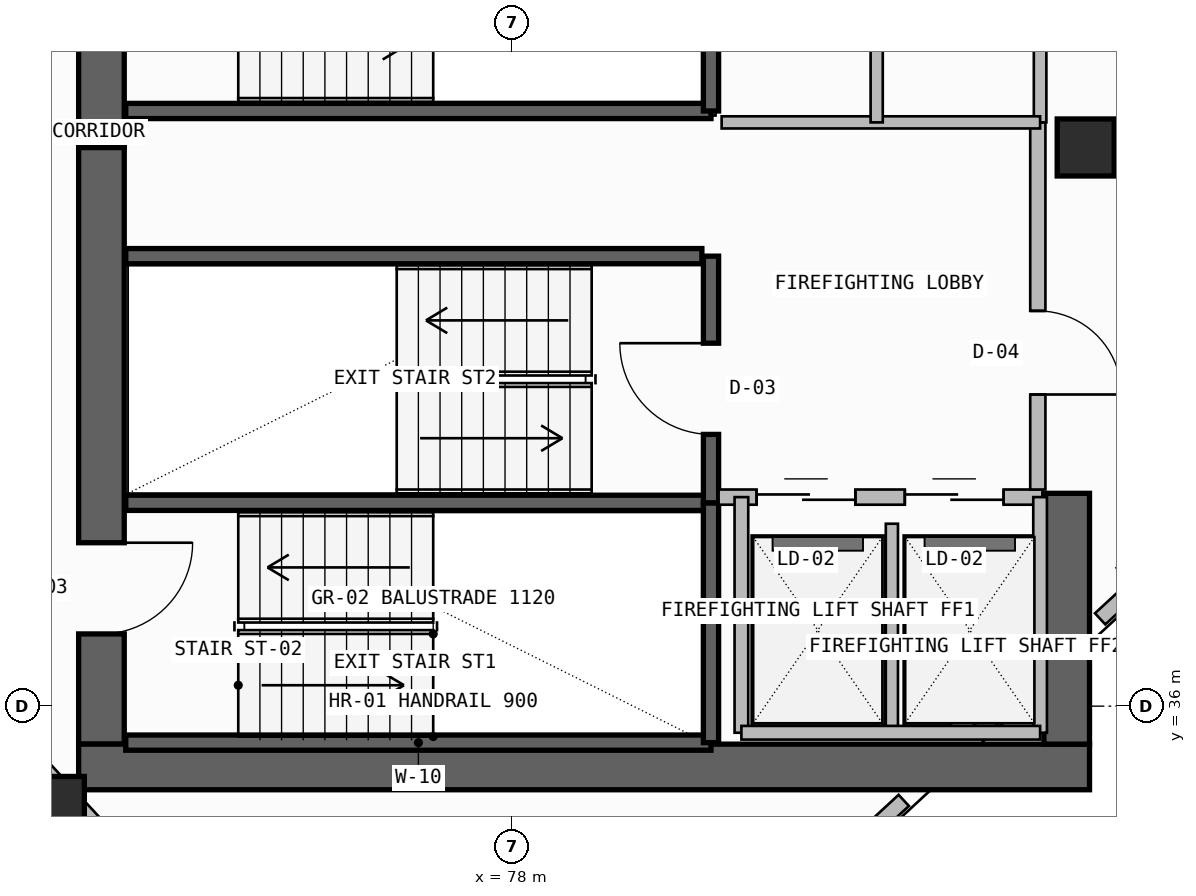
"""IFC4 building model, lengths in metres.
Left out: names, types, materials, properties, quantities, classifications, styles, units other than length and angle.
Written with IfcOpenShell. Run it as: python <this file> out.ifc"""

import sys

from ifc_helpers import new_model, si_unit, direction, frame, frame_2d, origin, origin_2d, place, context, subcontext, project, spatial, rectangle, extrude, element, fill, save


model = new_model("IFC4")
c1 = context("Model", 3, precision=1e-05, world=origin(), true_north=direction((0.0, 1.0)))
c2 = subcontext(c1, "Body", "Model", "MODEL_VIEW")
j1 = project(units=[si_unit("LENGTHUNIT", "METRE"), si_unit("PLANEANGLEUNIT", "RADIAN")], contexts=[c1])
p1 = place(None, origin())
s1 = spatial("IfcSite", under=j1, at=p1, CompositionType="ELEMENT")
p2 = place(p1, origin())
s2 = spatial("IfcBuilding", under=s1, at=p2, CompositionType="ELEMENT")
p3 = place(p2, frame((0.0, 0.0, 281.86)))
s3 = spatial("IfcBuildingStorey", under=s2, at=p3, CompositionType="ELEMENT", Elevation=281.86)
p4 = place(p3, frame((72.6, 35.5, -0.26), z_axis=(0.0, 0.0, 1.0), x_axis=(0.0, 1.0, 0.0)))
e1 = element("IfcWall", 1, at=p4, inside=s3, PredefinedType="SHEAR", context=c2, shape_type="SweptSolid", body=[
    extrude(rectangle(XDim=7.85, YDim=0.6, at=frame_2d((3.925, 0.0))), origin(), (0.0, 0.0, 1.0), 3.52),
])
p5 = place(p4, frame((1.45, 0.0, 0.26)))
e2 = element("IfcOpeningElement", 2, at=p5, cuts=e1, PredefinedType="OPENING", context=c2, shape_type="SweptSolid", body=[
    extrude(rectangle(XDim=1.2, YDim=2.2, at=frame_2d((0.6, 1.1))), frame((0.0, 0.31, 0.0), z_axis=(0.0, -1.0, 0.0), x_axis=(1.0, 0.0, 0.0)), (0.0, 0.0, 1.0), 0.62),
])
p6 = place(p3, frame((72.3, 35.2, -0.26), z_axis=(0.0, 0.0, 1.0), x_axis=(1.0, 0.0, 0.0)))
e3 = element("IfcWall", 3, at=p6, inside=s3, PredefinedType="SHEAR", context=c2, shape_type="SweptSolid", body=[
    extrude(rectangle(XDim=13.3, YDim=0.6, at=frame_2d((6.65, 0.0))), origin(), (0.0, 0.0, 1.0), 3.52),
])
p7 = place(p3, frame((85.3, 35.5, -0.26), z_axis=(0.0, 0.0, 1.0), x_axis=(0.0, 1.0, 0.0)))
e4 = element("IfcWall", 4, at=p7, inside=s3, PredefinedType="SHEAR", context=c2, shape_type="SweptSolid", body=[
    extrude(rectangle(XDim=3.3, YDim=0.6, at=frame_2d((1.65, 0.0))), origin(), (0.0, 0.0, 1.0), 3.52),
])
p8 = place(p3, frame((72.6, 43.35, -0.26), z_axis=(0.0, 0.0, 1.0), x_axis=(0.0, 1.0, 0.0)))
e5 = element("IfcWall", 5, at=p8, inside=s3, PredefinedType="SHEAR", context=c2, shape_type="SweptSolid", body=[
    extrude(rectangle(XDim=12.7, YDim=0.6, at=frame_2d((6.35, 0.0))), origin(), (0.0, 0.0, 1.0), 3.52),
])
p9 = place(p8, frame((1.35, 0.0, 0.26)))
e6 = element("IfcOpeningElement", 6, at=p9, cuts=e5, PredefinedType="OPENING", context=c2, shape_type="SweptSolid", body=[
    extrude(rectangle(XDim=1.2, YDim=2.2, at=frame_2d((0.6, 1.1))), frame((0.0, 0.31, 0.0), z_axis=(0.0, -1.0, 0.0), x_axis=(1.0, 0.0, 0.0)), (0.0, 0.0, 1.0), 0.62),
])
for number, where, z_axis, x_axis in (
    (7, (72.0, 34.7, 0.0), (0.0, 0.0, 1.0), (1.0, 0.0, 0.0)),
    (8, (85.55, 43.35, 0.0), (0.0, 0.0, 1.0), (1.0, 0.0, 0.0)),
):
    element("IfcColumn", number, at=place(p3, frame(where, z_axis=z_axis, x_axis=x_axis)), inside=s3, PredefinedType="COLUMN", context=c2, shape_type="SweptSolid", body=[
        extrude(rectangle(XDim=0.75, YDim=0.75, at=origin_2d()), origin(), (0.0, 0.0, 1.0), 3.52),
    ])
p10 = place(p3, frame((72.881, 34.058, 0.0), z_axis=(0.0, 0.0, 1.0), x_axis=(-0.678651758246, 0.734460203843, 0.0)))
e9 = element("IfcWall", 9, at=p10, inside=s3, PredefinedType="PARAPET", context=c2, shape_type="SweptSolid", body=[
    extrude(rectangle(XDim=0.927, YDim=0.2, at=frame_2d((0.464, 0.0))), origin(), (0.0, 0.0, 1.0), 1.15),
])
p11 = place(p3, frame((72.059, 34.948, 0.0), z_axis=(0.0, 0.0, 1.0), x_axis=(-0.678740051818, 0.734378609478, 0.0)))
e10 = element("IfcWall", 10, at=p11, inside=s3, PredefinedType="PARAPET", context=c2, shape_type="SweptSolid", body=[
    extrude(rectangle(XDim=0.97, YDim=0.2, at=frame_2d((0.485, 0.0))), origin(), (0.0, 0.0, 1.0), 1.15),
])
p12 = place(p3, frame((86.192, 37.566, 0.0), z_axis=(0.0, 0.0, 1.0), x_axis=(-0.734346728958, -0.678774544064, 0.0)))
e11 = element("IfcWall", 11, at=p12, inside=s3, PredefinedType="PARAPET", context=c2, shape_type="SweptSolid", body=[
    extrude(rectangle(XDim=0.615, YDim=0.2, at=frame_2d((0.308, 0.0))), origin(), (0.0, 0.0, 1.0), 1.15),
])
p13 = place(p3, frame((84.86, 36.335, 0.0), z_axis=(0.0, 0.0, 1.0), x_axis=(-0.734337093013, -0.678784968768, 0.0)))
e12 = element("IfcWall", 12, at=p13, inside=s3, PredefinedType="PARAPET", context=c2, shape_type="SweptSolid", body=[
    extrude(rectangle(XDim=1.024, YDim=0.2, at=frame_2d((0.512, 0.0))), origin(), (0.0, 0.0, 1.0), 1.15),
])
p14 = place(p3, frame((83.156, 34.76, 0.0), z_axis=(0.0, 0.0, 1.0), x_axis=(-0.734364355784, -0.678755473609, 0.0)))
e13 = element("IfcWall", 13, at=p14, inside=s3, PredefinedType="PARAPET", context=c2, shape_type="SweptSolid", body=[
    extrude(rectangle(XDim=1.045, YDim=0.2, at=frame_2d((0.522, 0.0))), origin(), (0.0, 0.0, 1.0), 1.15),
])
for number, where, z_axis, x_axis in (
    (14, (72.92, 35.52, -0.26), (0.0, 0.0, 1.0), (1.0, 0.0, 0.0)),
    (15, (72.92, 38.675, -0.26), (0.0, 0.0, 1.0), (1.0, 0.0, 0.0)),
):
    element("IfcWall", number, at=place(p3, frame(where, z_axis=z_axis, x_axis=x_axis)), inside=s3, PredefinedType="SOLIDWALL", context=c2, shape_type="SweptSolid", body=[
        extrude(rectangle(XDim=7.7, YDim=0.2, at=frame_2d((3.85, 0.0))), origin(), (0.0, 0.0, 1.0), 3.52),
    ])
p15 = place(p3, frame((80.62, 35.52, -0.26), z_axis=(0.0, 0.0, 1.0), x_axis=(0.0, 1.0, 0.0)))
e16 = element("IfcWall", 16, at=p15, inside=s3, PredefinedType="SOLIDWALL", context=c2, shape_type="SweptSolid", body=[
    extrude(rectangle(XDim=3.155, YDim=0.2, at=frame_2d((1.578, 0.0))), origin(), (0.0, 0.0, 1.0), 3.52),
])
p16 = place(p3, frame((80.62, 38.675, -0.26), z_axis=(0.0, 0.0, 1.0), x_axis=(0.0, 1.0, 0.0)))
e17 = element("IfcWall", 17, at=p16, inside=s3, PredefinedType="SOLIDWALL", context=c2, shape_type="SweptSolid", body=[
    extrude(rectangle(XDim=3.245, YDim=0.2, at=frame_2d((1.623, 0.0))), origin(), (0.0, 0.0, 1.0), 3.52),
])
p17 = place(p16, frame((0.9, 0.0, 0.26)))
e18 = element("IfcOpeningElement", 18, at=p17, cuts=e17, PredefinedType="OPENING", context=c2, shape_type="SweptSolid", body=[
    extrude(rectangle(XDim=1.2, YDim=2.2, at=frame_2d((0.6, 1.1))), frame((0.0, 0.11, 0.0), z_axis=(0.0, -1.0, 0.0), x_axis=(1.0, 0.0, 0.0)), (0.0, 0.0, 1.0), 0.22),
])
p18 = place(p3, frame((80.72, 38.75, 0.0), z_axis=(0.0, 0.0, 1.0), x_axis=(1.0, 0.0, 0.0)))
e19 = element("IfcWall", 19, at=p18, inside=s3, PredefinedType="SOLIDWALL", context=c2, shape_type="SweptSolid", body=[
    extrude(rectangle(XDim=4.26, YDim=0.2, at=frame_2d((2.13, 0.0))), origin(), (0.0, 0.0, 1.0), 3.26),
])
p19 = place(p18, frame((0.5, 0.0, 0.0)))
e20 = element("IfcOpeningElement", 20, at=p19, cuts=e19, PredefinedType="OPENING", context=c2, shape_type="SweptSolid", body=[
    extrude(rectangle(XDim=1.3, YDim=2.3, at=frame_2d((0.65, 1.15))), frame((0.0, 0.11, 0.0), z_axis=(0.0, -1.0, 0.0), x_axis=(1.0, 0.0, 0.0)), (0.0, 0.0, 1.0), 0.22),
])
p20 = place(p18, frame((2.45, 0.0, 0.0)))
e21 = element("IfcOpeningElement", 21, at=p20, cuts=e19, PredefinedType="OPENING", context=c2, shape_type="SweptSolid", body=[
    extrude(rectangle(XDim=1.3, YDim=2.3, at=frame_2d((0.65, 1.15))), frame((0.0, 0.11, 0.0), z_axis=(0.0, -1.0, 0.0), x_axis=(1.0, 0.0, 0.0)), (0.0, 0.0, 1.0), 0.22),
])
p21 = place(p3, frame((83.0, 35.65, 0.0), z_axis=(0.0, 0.0, 1.0), x_axis=(0.0, 1.0, 0.0)))
e22 = element("IfcWall", 22, at=p21, inside=s3, PredefinedType="PLUMBINGWALL", context=c2, shape_type="SweptSolid", body=[
    extrude(rectangle(XDim=2.75, YDim=0.16, at=frame_2d((1.375, 0.0))), origin(), (0.0, 0.0, 1.0), 3.26),
])
for number, where, z_axis, x_axis in (
    (23, (84.95, 35.65, 0.0), (0.0, 0.0, 1.0), (0.0, 1.0, 0.0)),
    (24, (81.02, 35.65, 0.0), (0.0, 0.0, 1.0), (0.0, 1.0, 0.0)),
):
    element("IfcWall", number, at=place(p3, frame(where, z_axis=z_axis, x_axis=x_axis)), inside=s3, PredefinedType="SOLIDWALL", context=c2, shape_type="SweptSolid", body=[
        extrude(rectangle(XDim=3.1, YDim=0.18, at=frame_2d((1.55, 0.0))), origin(), (0.0, 0.0, 1.0), 3.26),
    ])
p22 = place(p3, frame((81.02, 35.65, 0.0), z_axis=(0.0, 0.0, 1.0), x_axis=(1.0, 0.0, 0.0)))
e25 = element("IfcWall", 25, at=p22, inside=s3, PredefinedType="SOLIDWALL", context=c2, shape_type="SweptSolid", body=[
    extrude(rectangle(XDim=3.93, YDim=0.18, at=frame_2d((1.965, 0.0))), origin(), (0.0, 0.0, 1.0), 3.26),
])
p23 = place(p3, frame((84.92, 38.85, 0.0), z_axis=(0.0, 0.0, 1.0), x_axis=(0.0, 1.0, 0.0)))
e26 = element("IfcWall", 26, at=p23, inside=s3, PredefinedType="SOLIDWALL", context=c2, shape_type="SweptSolid", body=[
    extrude(rectangle(XDim=4.83, YDim=0.2, at=frame_2d((2.415, 0.0))), origin(), (0.0, 0.0, 1.0), 3.26),
])
p24 = place(p23, frame((1.25, 0.0, 0.0)))
e27 = element("IfcOpeningElement", 27, at=p24, cuts=e26, PredefinedType="OPENING", context=c2, shape_type="SweptSolid", body=[
    extrude(rectangle(XDim=1.1, YDim=2.2, at=frame_2d((0.55, 1.1))), frame((0.0, 0.11, 0.0), z_axis=(0.0, -1.0, 0.0), x_axis=(1.0, 0.0, 0.0)), (0.0, 0.0, 1.0), 0.22),
])
p25 = place(p3, frame((72.92, 41.92, -0.26), z_axis=(0.0, 0.0, 1.0), x_axis=(1.0, 0.0, 0.0)))
e28 = element("IfcWall", 28, at=p25, inside=s3, PredefinedType="SOLIDWALL", context=c2, shape_type="SweptSolid", body=[
    extrude(rectangle(XDim=7.58, YDim=0.2, at=frame_2d((3.79, 0.0))), origin(), (0.0, 0.0, 1.0), 3.52),
])
p26 = place(p3, frame((72.92, 43.83, -0.26), z_axis=(0.0, 0.0, 1.0), x_axis=(1.0, 0.0, 0.0)))
e29 = element("IfcWall", 29, at=p26, inside=s3, PredefinedType="SOLIDWALL", context=c2, shape_type="SweptSolid", body=[
    extrude(rectangle(XDim=7.7, YDim=0.2, at=frame_2d((3.85, 0.0))), origin(), (0.0, 0.0, 1.0), 3.52),
])
p27 = place(p3, frame((80.62, 43.83, -0.26), z_axis=(0.0, 0.0, 1.0), x_axis=(0.0, 1.0, 0.0)))
e30 = element("IfcWall", 30, at=p27, inside=s3, PredefinedType="SOLIDWALL", context=c2, shape_type="SweptSolid", body=[
    extrude(rectangle(XDim=3.24, YDim=0.2, at=frame_2d((1.62, 0.0))), origin(), (0.0, 0.0, 1.0), 3.52),
])
p28 = place(p3, frame((84.95, 43.68, 0.0), z_axis=(0.0, 0.0, 1.0), x_axis=(0.0, 1.0, 0.0)))
e31 = element("IfcWall", 31, at=p28, inside=s3, PredefinedType="PLUMBINGWALL", context=c2, shape_type="SweptSolid", body=[
    extrude(rectangle(XDim=1.9, YDim=0.165, at=frame_2d((0.95, 0.0))), origin(), (0.0, 0.0, 1.0), 3.26),
])
p29 = place(p3, frame((80.76, 43.68, 0.0), z_axis=(0.0, 0.0, 1.0), x_axis=(1.0, 0.0, 0.0)))
e32 = element("IfcWall", 32, at=p29, inside=s3, PredefinedType="PLUMBINGWALL", context=c2, shape_type="SweptSolid", body=[
    extrude(rectangle(XDim=4.19, YDim=0.16, at=frame_2d((2.095, 0.0))), origin(), (0.0, 0.0, 1.0), 3.26),
])
p30 = place(p3, frame((82.8, 43.68, 0.0), z_axis=(0.0, 0.0, 1.0), x_axis=(0.0, 1.0, 0.0)))
e33 = element("IfcWall", 33, at=p30, inside=s3, PredefinedType="PLUMBINGWALL", context=c2, shape_type="SweptSolid", body=[
    extrude(rectangle(XDim=1.9, YDim=0.16, at=frame_2d((0.95, 0.0))), origin(), (0.0, 0.0, 1.0), 3.26),
])
p31 = place(p5, frame((1.2, 0.0, 0.0), z_axis=(0.0, 0.0, 1.0), x_axis=(-1.0, 0.0, 0.0)))
e34 = element("IfcDoor", 34, at=p31, inside=s3, OperationType="SINGLE_SWING_LEFT", PredefinedType="USERDEFINED", context=c2, shape_type="SweptSolid", body=[
    extrude(rectangle(XDim=1.2, YDim=2.2, at=frame_2d((0.6, 1.1))), frame((0.0, 0.025, 0.0), z_axis=(0.0, -1.0, 0.0), x_axis=(1.0, 0.0, 0.0)), (0.0, 0.0, 1.0), 0.05),
])
fill(e2, e34)
p32 = place(p17, origin())
e35 = element("IfcDoor", 35, at=p32, inside=s3, OperationType="SINGLE_SWING_RIGHT", PredefinedType="USERDEFINED", context=c2, shape_type="SweptSolid", body=[
    extrude(rectangle(XDim=1.2, YDim=2.2, at=frame_2d((0.6, 1.1))), frame((0.0, 0.025, 0.0), z_axis=(0.0, -1.0, 0.0), x_axis=(1.0, 0.0, 0.0)), (0.0, 0.0, 1.0), 0.05),
])
fill(e18, e35)
p33 = place(p19, origin())
e36 = element("IfcDoor", 36, at=p33, inside=s3, OperationType="DOUBLE_DOOR_SLIDING", PredefinedType="DOOR", context=c2, shape_type="SweptSolid", body=[
    extrude(rectangle(XDim=1.3, YDim=2.3, at=frame_2d((0.65, 1.15))), frame((0.0, 0.025, 0.0), z_axis=(0.0, -1.0, 0.0), x_axis=(1.0, 0.0, 0.0)), (0.0, 0.0, 1.0), 0.05),
])
fill(e20, e36)
p34 = place(p20, origin())
e37 = element("IfcDoor", 37, at=p34, inside=s3, OperationType="DOUBLE_DOOR_SLIDING", PredefinedType="DOOR", context=c2, shape_type="SweptSolid", body=[
    extrude(rectangle(XDim=1.3, YDim=2.3, at=frame_2d((0.65, 1.15))), frame((0.0, 0.025, 0.0), z_axis=(0.0, -1.0, 0.0), x_axis=(1.0, 0.0, 0.0)), (0.0, 0.0, 1.0), 0.05),
])
fill(e21, e37)
p35 = place(p24, frame((1.1, 0.0, 0.0), z_axis=(0.0, 0.0, 1.0), x_axis=(-1.0, 0.0, 0.0)))
e38 = element("IfcDoor", 38, at=p35, inside=s3, OperationType="SINGLE_SWING_RIGHT", PredefinedType="DOOR", context=c2, shape_type="SweptSolid", body=[
    extrude(rectangle(XDim=1.1, YDim=2.2, at=frame_2d((0.55, 1.1))), frame((0.0, 0.025, 0.0), z_axis=(0.0, -1.0, 0.0), x_axis=(1.0, 0.0, 0.0)), (0.0, 0.0, 1.0), 0.05),
])
fill(e27, e38)
save(model, sys.argv[1])
